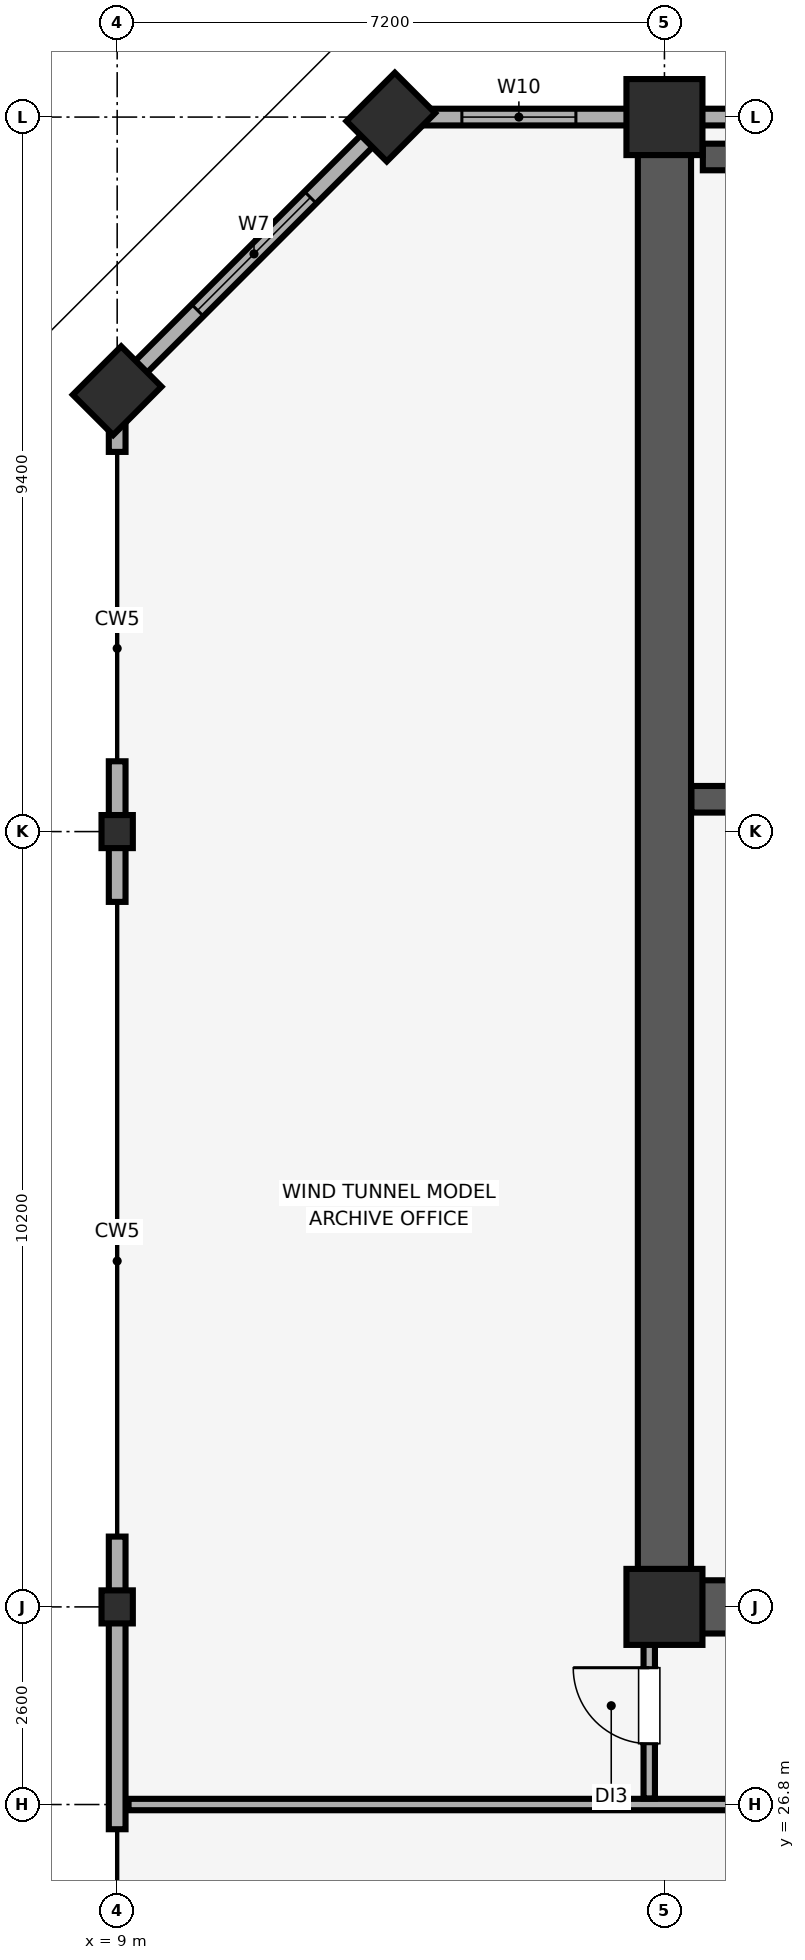
"""IFC4 building model, lengths in metres.
Left out: names, types, materials, properties, quantities, classifications, styles, units other than length and angle.
Written with IfcOpenShell. Run it as: python <this file> out.ifc"""

import sys

from ifc_helpers import new_model, si_unit, direction, frame, frame_2d, origin, origin_2d, place, context, subcontext, project, spatial, rectangle, i_section, extrude, element, fill, save


model = new_model("IFC4")
c1 = context("Model", 3, precision=1e-05, world=origin(), true_north=direction((0.0, 1.0)))
c2 = subcontext(c1, "Body", "Model", "MODEL_VIEW")
j1 = project(units=[si_unit("LENGTHUNIT", "METRE"), si_unit("PLANEANGLEUNIT", "RADIAN")], contexts=[c1])
p1 = place(None, origin())
s1 = spatial("IfcSite", under=j1, at=p1, CompositionType="ELEMENT")
p2 = place(p1, origin())
s2 = spatial("IfcBuilding", under=s1, at=p2, CompositionType="ELEMENT")
p3 = place(p2, frame((0.0, 0.0, 294.7)))
s3 = spatial("IfcBuildingStorey", under=s2, at=p3, CompositionType="ELEMENT", Elevation=294.7)
for number, where, z_axis, x_axis in (
    (1, (9.0, 29.4, 0.0), (0.0, 0.0, 1.0), (1.0, 0.0, 0.0)),
    (2, (9.0, 39.6, 0.0), (0.0, 0.0, 1.0), (1.0, 0.0, 0.0)),
):
    element("IfcColumn", number, at=place(p3, frame(where, z_axis=z_axis, x_axis=x_axis)), inside=s3, PredefinedType="COLUMN", context=c2, shape_type="SweptSolid", body=[
        extrude(i_section(OverallWidth=0.412, OverallDepth=0.435, WebThickness=0.036, FlangeThickness=0.056, FilletRadius=0.015, at=origin_2d()), origin(), (0.0, 0.0, 1.0), 5.12),
    ])
for number, where, z_axis, x_axis in (
    (3, (12.6, 49.0, 0.0), (0.0, 0.0, 1.0), (0.707, 0.707, 0.0)),
    (4, (9.0, 45.4, 0.0), (0.0, 0.0, 1.0), (0.707, 0.707, 0.0)),
):
    element("IfcColumn", number, at=place(p3, frame(where, z_axis=z_axis, x_axis=x_axis)), inside=s3, PredefinedType="PILASTER", context=c2, shape_type="SweptSolid", body=[
        extrude(rectangle(XDim=0.9, YDim=0.75, at=origin_2d()), origin(), (0.0, 0.0, 1.0), 5.12),
    ])
for number, where, z_axis, x_axis in (
    (5, (16.2, 29.4, 0.0), (0.0, 0.0, 1.0), (1.0, 0.0, 0.0)),
    (6, (16.2, 49.0, 0.0), (0.0, 0.0, 1.0), (1.0, 0.0, 0.0)),
):
    element("IfcColumn", number, at=place(p3, frame(where, z_axis=z_axis, x_axis=x_axis)), inside=s3, PredefinedType="COLUMN", context=c2, shape_type="SweptSolid", body=[
        extrude(rectangle(XDim=1.0, YDim=1.0, at=origin_2d()), origin(), (0.0, 0.0, 1.0), 5.12),
    ])
p4 = place(p3, frame((71.4, 49.0, 0.0), z_axis=(0.0, 0.0, 1.0), x_axis=(-1.0, 0.0, 0.0)))
e7 = element("IfcWall", 7, at=p4, inside=s3, PredefinedType="SOLIDWALL", context=c2, shape_type="SweptSolid", body=[
    extrude(rectangle(XDim=58.8, YDim=0.22, at=frame_2d((29.4, 0.0))), origin(), (0.0, 0.0, 1.0), 4.32),
])
p5 = place(p4, frame((56.365, 0.0, 0.85)))
e8 = element("IfcOpeningElement", 8, at=p5, cuts=e7, PredefinedType="OPENING", context=c2, shape_type="SweptSolid", body=[
    extrude(rectangle(XDim=1.5, YDim=1.4, at=frame_2d((0.75, 0.7))), frame((0.0, 0.12, 0.0), z_axis=(0.0, -1.0, 0.0), x_axis=(1.0, 0.0, 0.0)), (0.0, 0.0, 1.0), 0.24),
])
p6 = place(p4, frame((0.935, 0.0, 0.85)))
e9 = element("IfcOpeningElement", 9, at=p6, cuts=e7, PredefinedType="OPENING", context=c2, shape_type="SweptSolid", body=[
    extrude(rectangle(XDim=1.5, YDim=1.4, at=frame_2d((0.75, 0.7))), frame((0.0, 0.12, 0.0), z_axis=(0.0, -1.0, 0.0), x_axis=(1.0, 0.0, 0.0)), (0.0, 0.0, 1.0), 0.24),
])
p7 = place(p4, frame((43.865, 0.0, 0.9)))
e10 = element("IfcOpeningElement", 10, at=p7, cuts=e7, PredefinedType="OPENING", context=c2, shape_type="SweptSolid", body=[
    extrude(rectangle(XDim=1.5, YDim=1.4, at=frame_2d((0.75, 0.7))), frame((0.0, 0.12, 0.0), z_axis=(0.0, -1.0, 0.0), x_axis=(1.0, 0.0, 0.0)), (0.0, 0.0, 1.0), 0.24),
])
p8 = place(p4, frame((36.05, 0.0, 0.9)))
e11 = element("IfcOpeningElement", 11, at=p8, cuts=e7, PredefinedType="OPENING", context=c2, shape_type="SweptSolid", body=[
    extrude(rectangle(XDim=3.6, YDim=1.5, at=frame_2d((1.8, 0.75))), frame((0.0, 0.12, 0.0), z_axis=(0.0, -1.0, 0.0), x_axis=(1.0, 0.0, 0.0)), (0.0, 0.0, 1.0), 0.24),
])
p9 = place(p4, frame((22.65, 0.0, 0.9)))
e12 = element("IfcOpeningElement", 12, at=p9, cuts=e7, PredefinedType="OPENING", context=c2, shape_type="SweptSolid", body=[
    extrude(rectangle(XDim=1.5, YDim=1.4, at=frame_2d((0.75, 0.7))), frame((0.0, 0.12, 0.0), z_axis=(0.0, -1.0, 0.0), x_axis=(1.0, 0.0, 0.0)), (0.0, 0.0, 1.0), 0.24),
])
p10 = place(p4, frame((19.0, 0.0, 0.9)))
e13 = element("IfcOpeningElement", 13, at=p10, cuts=e7, PredefinedType="OPENING", context=c2, shape_type="SweptSolid", body=[
    extrude(rectangle(XDim=2.4, YDim=1.5, at=frame_2d((1.2, 0.75))), frame((0.0, 0.12, 0.0), z_axis=(0.0, -1.0, 0.0), x_axis=(1.0, 0.0, 0.0)), (0.0, 0.0, 1.0), 0.24),
])
p11 = place(p4, frame((14.635, 0.0, 0.9)))
e14 = element("IfcOpeningElement", 14, at=p11, cuts=e7, PredefinedType="OPENING", context=c2, shape_type="SweptSolid", body=[
    extrude(rectangle(XDim=2.4, YDim=1.5, at=frame_2d((1.2, 0.75))), frame((0.0, 0.12, 0.0), z_axis=(0.0, -1.0, 0.0), x_axis=(1.0, 0.0, 0.0)), (0.0, 0.0, 1.0), 0.24),
])
p12 = place(p3, frame((12.6, 49.0, 0.0), z_axis=(0.0, 0.0, 1.0), x_axis=(-0.707106781187, -0.707106781187, 0.0)))
e15 = element("IfcWall", 15, at=p12, inside=s3, PredefinedType="SOLIDWALL", context=c2, shape_type="SweptSolid", body=[
    extrude(rectangle(XDim=5.091, YDim=0.22, at=frame_2d((2.546, 0.0))), origin(), (0.0, 0.0, 1.0), 4.32),
])
p13 = place(p12, frame((1.496, 0.0, 0.85)))
e16 = element("IfcOpeningElement", 16, at=p13, cuts=e15, PredefinedType="OPENING", context=c2, shape_type="SweptSolid", body=[
    extrude(rectangle(XDim=2.1, YDim=1.6, at=frame_2d((1.05, 0.8))), frame((0.0, 0.12, 0.0), z_axis=(0.0, -1.0, 0.0), x_axis=(1.0, 0.0, 0.0)), (0.0, 0.0, 1.0), 0.24),
])
p14 = place(p3, frame((9.0, 45.4, 0.0), z_axis=(0.0, 0.0, 1.0), x_axis=(0.0, -1.0, 0.0)))
e17 = element("IfcWall", 17, at=p14, inside=s3, PredefinedType="SOLIDWALL", context=c2, shape_type="SweptSolid", body=[
    extrude(rectangle(XDim=0.805, YDim=0.22, at=frame_2d((0.402, 0.0))), origin(), (0.0, 0.0, 1.0), 5.12),
])
p15 = place(p3, frame((9.0, 40.525, 0.0), z_axis=(0.0, 0.0, 1.0), x_axis=(0.0, -1.0, 0.0)))
e18 = element("IfcWall", 18, at=p15, inside=s3, PredefinedType="SOLIDWALL", context=c2, shape_type="SweptSolid", body=[
    extrude(rectangle(XDim=1.85, YDim=0.22, at=frame_2d((0.925, 0.0))), origin(), (0.0, 0.0, 1.0), 4.32),
])
p16 = place(p3, frame((9.0, 30.325, 0.0), z_axis=(0.0, 0.0, 1.0), x_axis=(0.0, -1.0, 0.0)))
e19 = element("IfcWall", 19, at=p16, inside=s3, PredefinedType="SOLIDWALL", context=c2, shape_type="SweptSolid", body=[
    extrude(rectangle(XDim=3.85, YDim=0.22, at=frame_2d((1.925, 0.0))), origin(), (0.0, 0.0, 1.0), 4.32),
])
p17 = place(p3, frame((16.2, 29.4, 0.0), z_axis=(0.0, 0.0, 1.0), x_axis=(0.0, 1.0, 0.0)))
e20 = element("IfcWall", 20, at=p17, inside=s3, PredefinedType="SHEAR", context=c2, shape_type="SweptSolid", body=[
    extrude(rectangle(XDim=19.2, YDim=0.7, at=frame_2d((9.6, 0.0))), origin(), (0.0, 0.0, 1.0), 5.12),
])
p18 = place(p3, frame((16.555, 29.4, 0.0), z_axis=(0.0, 0.0, 1.0), x_axis=(1.0, 0.0, 0.0)))
e21 = element("IfcWall", 21, at=p18, inside=s3, PredefinedType="SHEAR", context=c2, shape_type="SweptSolid", body=[
    extrude(rectangle(XDim=7.045, YDim=0.7, at=frame_2d((3.522, 0.0))), origin(), (0.0, 0.0, 1.0), 5.12),
])
p19 = place(p3, frame((16.555, 40.025, 0.0), z_axis=(0.0, 0.0, 1.0), x_axis=(1.0, 0.0, 0.0)))
e22 = element("IfcWall", 22, at=p19, inside=s3, PredefinedType="SHEAR", context=c2, shape_type="SweptSolid", body=[
    extrude(rectangle(XDim=4.3, YDim=0.35, at=frame_2d((2.15, 0.0))), origin(), (0.0, 0.0, 1.0), 5.12),
])
p20 = place(p19, frame((1.91, 0.0, 0.0)))
e23 = element("IfcOpeningElement", 23, at=p20, cuts=e22, PredefinedType="OPENING", context=c2, shape_type="SweptSolid", body=[
    extrude(rectangle(XDim=1.15, YDim=2.15, at=frame_2d((0.575, 1.075))), frame((0.0, 0.185, 0.0), z_axis=(0.0, -1.0, 0.0), x_axis=(1.0, 0.0, 0.0)), (0.0, 0.0, 1.0), 0.37),
])
p21 = place(p3, frame((16.705, 48.475, 0.0), z_axis=(0.0, 0.0, 1.0), x_axis=(1.0, 0.0, 0.0)))
e24 = element("IfcWall", 24, at=p21, inside=s3, PredefinedType="SHEAR", context=c2, shape_type="SweptSolid", body=[
    extrude(rectangle(XDim=4.15, YDim=0.35, at=frame_2d((2.075, 0.0))), origin(), (0.0, 0.0, 1.0), 5.12),
])
p22 = place(p3, frame((9.15, 26.8, 0.0), z_axis=(0.0, 0.0, 1.0), x_axis=(1.0, 0.0, 0.0)))
e25 = element("IfcWall", 25, at=p22, inside=s3, PredefinedType="PARTITIONING", context=c2, shape_type="SweptSolid", body=[
    extrude(rectangle(XDim=29.17, YDim=0.15, at=frame_2d((14.585, 0.0))), origin(), (0.0, 0.0, 1.0), 5.12),
])
p23 = place(p22, frame((17.1, 0.0, 0.0)))
e26 = element("IfcOpeningElement", 26, at=p23, cuts=e25, PredefinedType="OPENING", context=c2, shape_type="SweptSolid", body=[
    extrude(rectangle(XDim=1.5, YDim=2.25, at=frame_2d((0.75, 1.125))), frame((0.0, 0.085, 0.0), z_axis=(0.0, -1.0, 0.0), x_axis=(1.0, 0.0, 0.0)), (0.0, 0.0, 1.0), 0.17),
])
p24 = place(p3, frame((16.0, 26.88, 0.0), z_axis=(0.0, 0.0, 1.0), x_axis=(0.0, 1.0, 0.0)))
e27 = element("IfcWall", 27, at=p24, inside=s3, PredefinedType="PARTITIONING", context=c2, shape_type="SweptSolid", body=[
    extrude(rectangle(XDim=2.51, YDim=0.15, at=frame_2d((1.255, 0.0))), origin(), (0.0, 0.0, 1.0), 4.76),
])
p25 = place(p24, frame((0.72, 0.0, 0.0)))
e28 = element("IfcOpeningElement", 28, at=p25, cuts=e27, PredefinedType="OPENING", context=c2, shape_type="SweptSolid", body=[
    extrude(rectangle(XDim=1.0, YDim=2.15, at=frame_2d((0.5, 1.075))), frame((0.0, 0.085, 0.0), z_axis=(0.0, -1.0, 0.0), x_axis=(1.0, 0.0, 0.0)), (0.0, 0.0, 1.0), 0.17),
])
p26 = place(p13, origin())
e29 = element("IfcWindow", 29, at=p26, inside=s3, PartitioningType="SINGLE_PANEL", PredefinedType="WINDOW", context=c2, shape_type="SweptSolid", body=[
    extrude(rectangle(XDim=2.1, YDim=1.6, at=frame_2d((1.05, 0.8))), frame((0.0, 0.03, 0.0), z_axis=(0.0, -1.0, 0.0), x_axis=(1.0, 0.0, 0.0)), (0.0, 0.0, 1.0), 0.06),
])
fill(e16, e29)
p27 = place(p5, origin())
e30 = element("IfcWindow", 30, at=p27, inside=s3, PartitioningType="SINGLE_PANEL", PredefinedType="WINDOW", context=c2, shape_type="SweptSolid", body=[
    extrude(rectangle(XDim=1.5, YDim=1.4, at=frame_2d((0.75, 0.7))), frame((0.0, 0.03, 0.0), z_axis=(0.0, -1.0, 0.0), x_axis=(1.0, 0.0, 0.0)), (0.0, 0.0, 1.0), 0.06),
])
fill(e8, e30)
p28 = place(p25, origin())
e31 = element("IfcDoor", 31, at=p28, inside=s3, OperationType="SINGLE_SWING_RIGHT", PredefinedType="DOOR", context=c2, shape_type="SweptSolid", body=[
    extrude(rectangle(XDim=1.0, YDim=2.15, at=frame_2d((0.5, 1.075))), frame((0.0, 0.025, 0.0), z_axis=(0.0, -1.0, 0.0), x_axis=(1.0, 0.0, 0.0)), (0.0, 0.0, 1.0), 0.05),
])
fill(e28, e31)
save(model, sys.argv[1])
